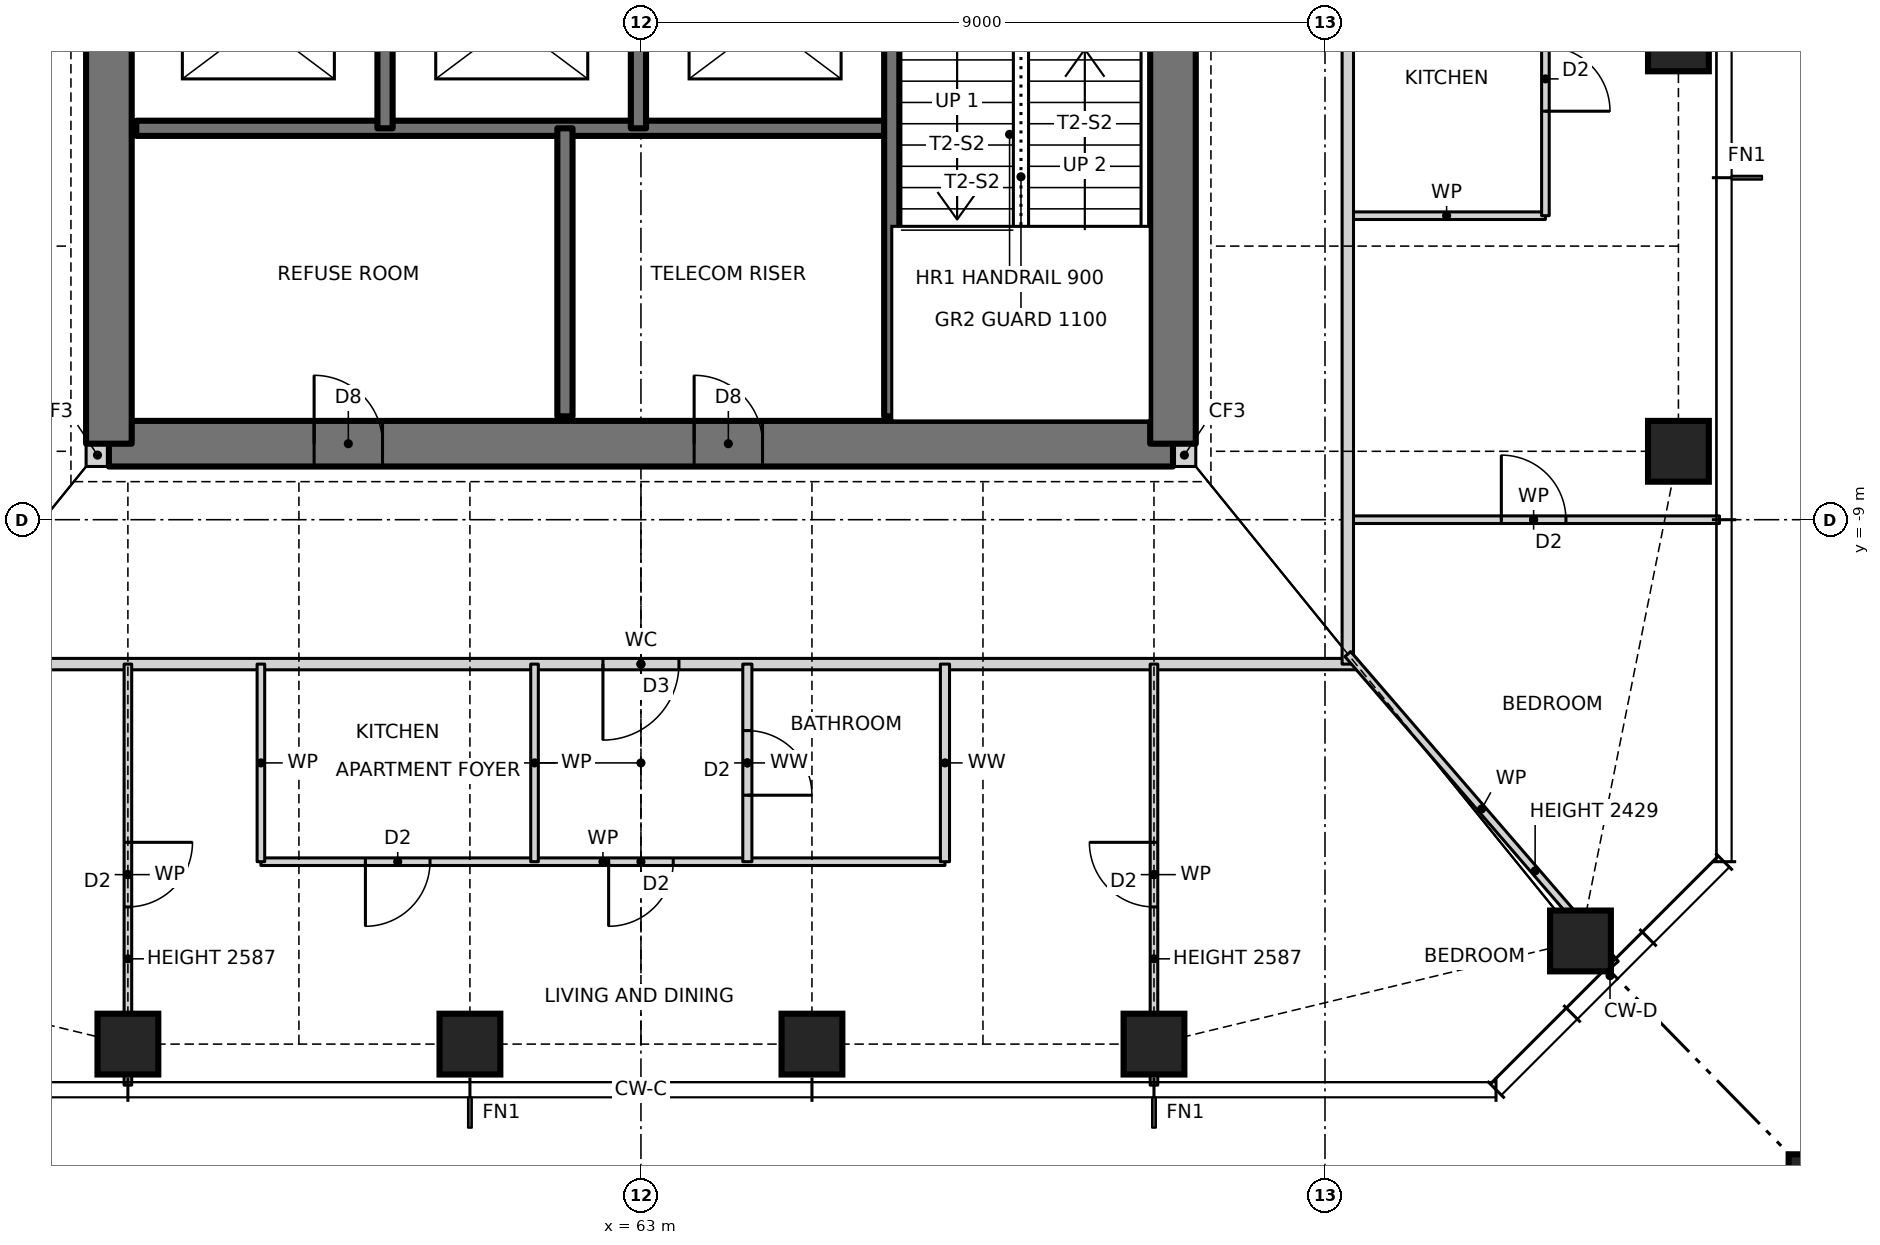
"""IFC4 building model, lengths in metres.
Left out: names, types, materials, properties, quantities, classifications, styles, units other than length and angle.
Written with IfcOpenShell. Run it as: python <this file> out.ifc"""

import sys

from ifc_helpers import new_model, si_unit, direction, frame, frame_2d, origin, origin_2d, place, context, subcontext, project, spatial, rectangle, hollow_rectangle, extrude, element, fill, save


model = new_model("IFC4")
c1 = context("Model", 3, precision=1e-05, world=origin(), true_north=direction((0.0, 1.0)))
c2 = subcontext(c1, "Body", "Model", "MODEL_VIEW")
j1 = project(units=[si_unit("LENGTHUNIT", "METRE"), si_unit("PLANEANGLEUNIT", "RADIAN")], contexts=[c1])
p1 = place(None, origin())
s1 = spatial("IfcSite", under=j1, at=p1, CompositionType="ELEMENT")
p2 = place(p1, origin())
s2 = spatial("IfcBuilding", under=s1, at=p2, CompositionType="ELEMENT")
p3 = place(p2, frame((0.0, 0.0, 122.5)))
s3 = spatial("IfcBuildingStorey", under=s2, at=p3, CompositionType="ELEMENT", Elevation=122.5)
for number, where, z_axis, x_axis in (
    (1, (56.25, -15.9, 0.0), (0.0, 0.0, 1.0), (1.0, 0.0, 0.0)),
    (2, (60.75, -15.9, 0.0), (0.0, 0.0, 1.0), (1.0, 0.0, 0.0)),
    (3, (65.25, -15.9, 0.0), (0.0, 0.0, 1.0), (1.0, 0.0, 0.0)),
    (4, (69.75, -15.9, 0.0), (0.0, 0.0, 1.0), (1.0, 0.0, 0.0)),
    (5, (75.361, -14.543, 0.0), (0.0, 0.0, 1.0), (1.0, 0.0, 0.0)),
    (6, (76.65, -8.1, 0.0), (0.0, 0.0, 1.0), (1.0, 0.0, 0.0)),
    (7, (76.65, -2.7, 0.0), (0.0, 0.0, 1.0), (1.0, 0.0, 0.0)),
):
    element("IfcColumn", number, at=place(p3, frame(where, z_axis=z_axis, x_axis=x_axis)), inside=s3, PredefinedType="COLUMN", context=c2, shape_type="SweptSolid", body=[
        extrude(hollow_rectangle(XDim=0.8, YDim=0.8, WallThickness=0.1, at=origin_2d()), origin(), (0.0, 0.0, 1.0), 3.5),
    ])
p4 = place(p3, frame((78.65, -17.9, 0.0), z_axis=(0.0, 0.0, 1.0), x_axis=(1.0, 0.0, 0.0)))
e8 = element("IfcColumn", 8, at=p4, inside=s3, PredefinedType="COLUMN", context=c2, shape_type="SweptSolid", body=[
    extrude(hollow_rectangle(XDim=1.1, YDim=1.1, WallThickness=0.06, at=origin_2d()), origin(), (0.0, 0.0, 1.0), 3.5),
])
for number, where, z_axis, x_axis in (
    (9, (55.7, -8.15, 0.0), (0.0, 0.0, 1.0), (1.0, 0.0, 0.0)),
    (10, (70.0, -8.15, 0.0), (0.0, 0.0, 1.0), (1.0, 0.0, 0.0)),
):
    element("IfcWall", number, at=place(p3, frame(where, z_axis=z_axis, x_axis=x_axis)), inside=s3, PredefinedType="SOLIDWALL", context=c2, shape_type="SweptSolid", body=[
        extrude(rectangle(XDim=0.3, YDim=0.3, at=frame_2d((0.15, 0.0))), origin(), (0.0, 0.0, 1.0), 3.5),
    ])
p5 = place(p3, frame((56.0, -8.0, 0.0), z_axis=(0.0, 0.0, 1.0), x_axis=(1.0, 0.0, 0.0)))
e11 = element("IfcWall", 11, at=p5, inside=s3, PredefinedType="SHEAR", context=c2, shape_type="SweptSolid", body=[
    extrude(rectangle(XDim=14.0, YDim=0.6, at=frame_2d((7.0, 0.0))), origin(), (0.0, 0.0, 1.0), 3.5),
])
p6 = place(p5, frame((2.7, 0.0, 0.0)))
e12 = element("IfcOpeningElement", 12, at=p6, cuts=e11, PredefinedType="OPENING", context=c2, shape_type="SweptSolid", body=[
    extrude(rectangle(XDim=0.9, YDim=2.1, at=frame_2d((0.45, 1.05))), frame((0.0, 0.31, 0.0), z_axis=(0.0, -1.0, 0.0), x_axis=(1.0, 0.0, 0.0)), (0.0, 0.0, 1.0), 0.62),
])
p7 = place(p5, frame((7.7, 0.0, 0.0)))
e13 = element("IfcOpeningElement", 13, at=p7, cuts=e11, PredefinedType="OPENING", context=c2, shape_type="SweptSolid", body=[
    extrude(rectangle(XDim=0.9, YDim=2.1, at=frame_2d((0.45, 1.05))), frame((0.0, 0.31, 0.0), z_axis=(0.0, -1.0, 0.0), x_axis=(1.0, 0.0, 0.0)), (0.0, 0.0, 1.0), 0.62),
])
p8 = place(p3, frame((70.0, -8.0, 0.0), z_axis=(0.0, 0.0, 1.0), x_axis=(0.0, 1.0, 0.0)))
e14 = element("IfcWall", 14, at=p8, inside=s3, PredefinedType="SHEAR", context=c2, shape_type="SweptSolid", body=[
    extrude(rectangle(XDim=16.0, YDim=0.6, at=frame_2d((8.0, 0.0))), origin(), (0.0, 0.0, 1.0), 3.5),
])
p9 = place(p8, frame((7.5, 0.0, 0.0)))
e15 = element("IfcOpeningElement", 15, at=p9, cuts=e14, PredefinedType="OPENING", context=c2, shape_type="SweptSolid", body=[
    extrude(rectangle(XDim=1.0, YDim=2.1, at=frame_2d((0.5, 1.05))), frame((0.0, 0.31, 0.0), z_axis=(0.0, -1.0, 0.0), x_axis=(1.0, 0.0, 0.0)), (0.0, 0.0, 1.0), 0.62),
])
p10 = place(p3, frame((56.0, 8.0, 0.0), z_axis=(0.0, 0.0, 1.0), x_axis=(0.0, -1.0, 0.0)))
e16 = element("IfcWall", 16, at=p10, inside=s3, PredefinedType="SHEAR", context=c2, shape_type="SweptSolid", body=[
    extrude(rectangle(XDim=16.0, YDim=0.6, at=frame_2d((8.0, 0.0))), origin(), (0.0, 0.0, 1.0), 3.5),
])
p11 = place(p10, frame((7.5, 0.0, 0.0)))
e17 = element("IfcOpeningElement", 17, at=p11, cuts=e16, PredefinedType="OPENING", context=c2, shape_type="SweptSolid", body=[
    extrude(rectangle(XDim=1.0, YDim=2.1, at=frame_2d((0.5, 1.05))), frame((0.0, 0.31, 0.0), z_axis=(0.0, -1.0, 0.0), x_axis=(1.0, 0.0, 0.0)), (0.0, 0.0, 1.0), 0.62),
])
p12 = place(p3, frame((58.0, -13.5, 0.0), z_axis=(0.0, 0.0, 1.0), x_axis=(1.0, 0.0, 0.0)))
e18 = element("IfcWall", 18, at=p12, inside=s3, PredefinedType="PARTITIONING", context=c2, shape_type="SweptSolid", body=[
    extrude(rectangle(XDim=9.0, YDim=0.1, at=frame_2d((4.5, 0.0))), origin(), (0.0, 0.0, 1.0), 3.27),
])
p13 = place(p12, frame((1.375, 0.0, 0.0)))
e19 = element("IfcOpeningElement", 19, at=p13, cuts=e18, PredefinedType="OPENING", context=c2, shape_type="SweptSolid", body=[
    extrude(rectangle(XDim=0.85, YDim=2.1, at=frame_2d((0.425, 1.05))), frame((0.0, 0.06, 0.0), z_axis=(0.0, -1.0, 0.0), x_axis=(1.0, 0.0, 0.0)), (0.0, 0.0, 1.0), 0.12),
])
p14 = place(p12, frame((4.575, 0.0, 0.0)))
e20 = element("IfcOpeningElement", 20, at=p14, cuts=e18, PredefinedType="OPENING", context=c2, shape_type="SweptSolid", body=[
    extrude(rectangle(XDim=0.85, YDim=2.1, at=frame_2d((0.425, 1.05))), frame((0.0, 0.06, 0.0), z_axis=(0.0, -1.0, 0.0), x_axis=(1.0, 0.0, 0.0)), (0.0, 0.0, 1.0), 0.12),
])
p15 = place(p3, frame((53.586, -10.9, 0.0), z_axis=(0.0, 0.0, 1.0), x_axis=(1.0, 0.0, 0.0)))
e21 = element("IfcWall", 21, at=p15, inside=s3, PredefinedType="PARTITIONING", context=c2, shape_type="SweptSolid", body=[
    extrude(rectangle(XDim=18.828, YDim=0.15, at=frame_2d((9.414, 0.0))), origin(), (0.0, 0.0, 1.0), 3.27),
])
p16 = place(p15, frame((8.914, 0.0, 0.0)))
e22 = element("IfcOpeningElement", 22, at=p16, cuts=e21, PredefinedType="OPENING", context=c2, shape_type="SweptSolid", body=[
    extrude(rectangle(XDim=1.0, YDim=2.1, at=frame_2d((0.5, 1.05))), frame((0.0, 0.085, 0.0), z_axis=(0.0, -1.0, 0.0), x_axis=(1.0, 0.0, 0.0)), (0.0, 0.0, 1.0), 0.17),
])
p17 = place(p3, frame((72.3, -9.0, 0.0), z_axis=(0.0, 0.0, 1.0), x_axis=(1.0, 0.0, 0.0)))
e23 = element("IfcWall", 23, at=p17, inside=s3, PredefinedType="PARTITIONING", context=c2, shape_type="SweptSolid", body=[
    extrude(rectangle(XDim=4.89, YDim=0.1, at=frame_2d((2.445, 0.0))), origin(), (0.0, 0.0, 1.0), 3.27),
])
p18 = place(p17, frame((2.02, 0.0, 0.0)))
e24 = element("IfcOpeningElement", 24, at=p18, cuts=e23, PredefinedType="OPENING", context=c2, shape_type="SweptSolid", body=[
    extrude(rectangle(XDim=0.85, YDim=2.1, at=frame_2d((0.425, 1.05))), frame((0.0, 0.06, 0.0), z_axis=(0.0, -1.0, 0.0), x_axis=(1.0, 0.0, 0.0)), (0.0, 0.0, 1.0), 0.12),
])
p19 = place(p3, frame((72.3, -5.0, 0.0), z_axis=(0.0, 0.0, 1.0), x_axis=(1.0, 0.0, 0.0)))
e25 = element("IfcWall", 25, at=p19, inside=s3, PredefinedType="PARTITIONING", context=c2, shape_type="SweptSolid", body=[
    extrude(rectangle(XDim=2.6, YDim=0.1, at=frame_2d((1.3, 0.0))), origin(), (0.0, 0.0, 1.0), 3.27),
])
p20 = place(p3, frame((56.36, -3.85, 0.0), z_axis=(0.0, 0.0, 1.0), x_axis=(1.0, 0.0, 0.0)))
e26 = element("IfcWall", 26, at=p20, inside=s3, PredefinedType="SOLIDWALL", context=c2, shape_type="SweptSolid", body=[
    extrude(rectangle(XDim=9.94, YDim=0.2, at=frame_2d((4.97, 0.0))), origin(), (0.0, 0.0, 1.0), 3.5),
])
p21 = place(p3, frame((74.9, -5.0, 0.0), z_axis=(0.0, 0.0, 1.0), x_axis=(0.0, 1.0, 0.0)))
e27 = element("IfcWall", 27, at=p21, inside=s3, PredefinedType="PARTITIONING", context=c2, shape_type="SweptSolid", body=[
    extrude(rectangle(XDim=9.0, YDim=0.1, at=frame_2d((4.5, 0.0))), origin(), (0.0, 0.0, 1.0), 3.27),
])
p22 = place(p21, frame((1.375, 0.0, 0.0)))
e28 = element("IfcOpeningElement", 28, at=p22, cuts=e27, PredefinedType="OPENING", context=c2, shape_type="SweptSolid", body=[
    extrude(rectangle(XDim=0.85, YDim=2.1, at=frame_2d((0.425, 1.05))), frame((0.0, 0.06, 0.0), z_axis=(0.0, -1.0, 0.0), x_axis=(1.0, 0.0, 0.0)), (0.0, 0.0, 1.0), 0.12),
])
p23 = place(p21, frame((4.575, 0.0, 0.0)))
e29 = element("IfcOpeningElement", 29, at=p23, cuts=e27, PredefinedType="OPENING", context=c2, shape_type="SweptSolid", body=[
    extrude(rectangle(XDim=0.85, YDim=2.1, at=frame_2d((0.425, 1.05))), frame((0.0, 0.06, 0.0), z_axis=(0.0, -1.0, 0.0), x_axis=(1.0, 0.0, 0.0)), (0.0, 0.0, 1.0), 0.12),
])
p24 = place(p3, frame((72.3, -10.9, 0.0), z_axis=(0.0, 0.0, 1.0), x_axis=(0.0, 1.0, 0.0)))
e30 = element("IfcWall", 30, at=p24, inside=s3, PredefinedType="PARTITIONING", context=c2, shape_type="SweptSolid", body=[
    extrude(rectangle(XDim=21.668, YDim=0.15, at=frame_2d((10.834, 0.0))), origin(), (0.0, 0.0, 1.0), 3.27),
])
p25 = place(p24, frame((10.4, 0.0, 0.0)))
e31 = element("IfcOpeningElement", 31, at=p25, cuts=e30, PredefinedType="OPENING", context=c2, shape_type="SweptSolid", body=[
    extrude(rectangle(XDim=1.0, YDim=2.1, at=frame_2d((0.5, 1.05))), frame((0.0, 0.085, 0.0), z_axis=(0.0, -1.0, 0.0), x_axis=(1.0, 0.0, 0.0)), (0.0, 0.0, 1.0), 0.17),
])
p26 = place(p3, frame((69.75, -16.44, 0.0), z_axis=(0.0, 0.0, 1.0), x_axis=(0.0, 1.0, 0.0)))
e32 = element("IfcWall", 32, at=p26, inside=s3, PredefinedType="PARTITIONING", context=c2, shape_type="SweptSolid", body=[
    extrude(rectangle(XDim=5.54, YDim=0.1, at=frame_2d((2.77, 0.0))), origin(), (0.0, 0.0, 1.0), 2.587),
])
p27 = place(p26, frame((2.345, 0.0, 0.0)))
e33 = element("IfcOpeningElement", 33, at=p27, cuts=e32, PredefinedType="OPENING", context=c2, shape_type="SweptSolid", body=[
    extrude(rectangle(XDim=0.85, YDim=2.1, at=frame_2d((0.425, 1.05))), frame((0.0, 0.06, 0.0), z_axis=(0.0, -1.0, 0.0), x_axis=(1.0, 0.0, 0.0)), (0.0, 0.0, 1.0), 0.12),
])
p28 = place(p3, frame((67.0, -13.5, 0.0), z_axis=(0.0, 0.0, 1.0), x_axis=(0.0, 1.0, 0.0)))
e34 = element("IfcWall", 34, at=p28, inside=s3, PredefinedType="PARTITIONING", context=c2, shape_type="SweptSolid", body=[
    extrude(rectangle(XDim=2.6, YDim=0.12, at=frame_2d((1.3, 0.0))), origin(), (0.0, 0.0, 1.0), 3.27),
])
p29 = place(p3, frame((66.3, -7.64, 0.0), z_axis=(0.0, 0.0, 1.0), x_axis=(0.0, 1.0, 0.0)))
e35 = element("IfcWall", 35, at=p29, inside=s3, PredefinedType="SOLIDWALL", context=c2, shape_type="SweptSolid", body=[
    extrude(rectangle(XDim=11.49, YDim=0.2, at=frame_2d((5.745, 0.0))), origin(), (0.0, 0.0, 1.0), 3.5),
])
p30 = place(p29, frame((7.04, 0.0, 0.0)))
e36 = element("IfcOpeningElement", 36, at=p30, cuts=e35, PredefinedType="OPENING", context=c2, shape_type="SweptSolid", body=[
    extrude(rectangle(XDim=1.2, YDim=2.1, at=frame_2d((0.6, 1.05))), frame((0.0, 0.11, 0.0), z_axis=(0.0, -1.0, 0.0), x_axis=(1.0, 0.0, 0.0)), (0.0, 0.0, 1.0), 0.22),
])
p31 = place(p3, frame((64.4, -13.5, 0.0), z_axis=(0.0, 0.0, 1.0), x_axis=(0.0, 1.0, 0.0)))
e37 = element("IfcWall", 37, at=p31, inside=s3, PredefinedType="PARTITIONING", context=c2, shape_type="SweptSolid", body=[
    extrude(rectangle(XDim=2.6, YDim=0.12, at=frame_2d((1.3, 0.0))), origin(), (0.0, 0.0, 1.0), 3.27),
])
p32 = place(p31, frame((0.875, 0.0, 0.0)))
e38 = element("IfcOpeningElement", 38, at=p32, cuts=e37, PredefinedType="OPENING", context=c2, shape_type="SweptSolid", body=[
    extrude(rectangle(XDim=0.85, YDim=2.1, at=frame_2d((0.425, 1.05))), frame((0.0, 0.07, 0.0), z_axis=(0.0, -1.0, 0.0), x_axis=(1.0, 0.0, 0.0)), (0.0, 0.0, 1.0), 0.14),
])
p33 = place(p3, frame((62.967, -3.85, 0.0), z_axis=(0.0, 0.0, 1.0), x_axis=(0.0, 1.0, 0.0)))
e39 = element("IfcWall", 39, at=p33, inside=s3, PredefinedType="SOLIDWALL", context=c2, shape_type="SweptSolid", body=[
    extrude(rectangle(XDim=2.8, YDim=0.2, at=frame_2d((1.4, 0.0))), origin(), (0.0, 0.0, 1.0), 3.5),
])
p34 = place(p3, frame((62.0, -7.64, 0.0), z_axis=(0.0, 0.0, 1.0), x_axis=(0.0, 1.0, 0.0)))
e40 = element("IfcWall", 40, at=p34, inside=s3, PredefinedType="SOLIDWALL", context=c2, shape_type="SweptSolid", body=[
    extrude(rectangle(XDim=3.79, YDim=0.2, at=frame_2d((1.895, 0.0))), origin(), (0.0, 0.0, 1.0), 3.5),
])
p35 = place(p3, frame((61.6, -13.5, 0.0), z_axis=(0.0, 0.0, 1.0), x_axis=(0.0, 1.0, 0.0)))
e41 = element("IfcWall", 41, at=p35, inside=s3, PredefinedType="PARTITIONING", context=c2, shape_type="SweptSolid", body=[
    extrude(rectangle(XDim=2.6, YDim=0.1, at=frame_2d((1.3, 0.0))), origin(), (0.0, 0.0, 1.0), 3.27),
])
p36 = place(p3, frame((59.633, -3.85, 0.0), z_axis=(0.0, 0.0, 1.0), x_axis=(0.0, 1.0, 0.0)))
e42 = element("IfcWall", 42, at=p36, inside=s3, PredefinedType="SOLIDWALL", context=c2, shape_type="SweptSolid", body=[
    extrude(rectangle(XDim=2.8, YDim=0.2, at=frame_2d((1.4, 0.0))), origin(), (0.0, 0.0, 1.0), 3.5),
])
p37 = place(p3, frame((58.0, -13.5, 0.0), z_axis=(0.0, 0.0, 1.0), x_axis=(0.0, 1.0, 0.0)))
e43 = element("IfcWall", 43, at=p37, inside=s3, PredefinedType="PARTITIONING", context=c2, shape_type="SweptSolid", body=[
    extrude(rectangle(XDim=2.6, YDim=0.1, at=frame_2d((1.3, 0.0))), origin(), (0.0, 0.0, 1.0), 3.27),
])
p38 = place(p3, frame((56.25, -16.44, 0.0), z_axis=(0.0, 0.0, 1.0), x_axis=(0.0, 1.0, 0.0)))
e44 = element("IfcWall", 44, at=p38, inside=s3, PredefinedType="PARTITIONING", context=c2, shape_type="SweptSolid", body=[
    extrude(rectangle(XDim=5.54, YDim=0.1, at=frame_2d((2.77, 0.0))), origin(), (0.0, 0.0, 1.0), 2.587),
])
p39 = place(p38, frame((2.345, 0.0, 0.0)))
e45 = element("IfcOpeningElement", 45, at=p39, cuts=e44, PredefinedType="OPENING", context=c2, shape_type="SweptSolid", body=[
    extrude(rectangle(XDim=0.85, YDim=2.1, at=frame_2d((0.425, 1.05))), frame((0.0, 0.06, 0.0), z_axis=(0.0, -1.0, 0.0), x_axis=(1.0, 0.0, 0.0)), (0.0, 0.0, 1.0), 0.12),
])
p40 = place(p3, frame((75.821, -14.844, 0.0), z_axis=(0.0, 0.0, 1.0), x_axis=(-0.653713095188, 0.756742485381, 0.0)))
e46 = element("IfcWall", 46, at=p40, inside=s3, PredefinedType="PARTITIONING", context=c2, shape_type="SweptSolid", body=[
    extrude(rectangle(XDim=5.386, YDim=0.1, at=frame_2d((2.693, 0.0))), origin(), (0.0, 0.0, 1.0), 2.429),
])
p41 = place(p13, frame((0.85, 0.0, 0.0), z_axis=(0.0, 0.0, 1.0), x_axis=(-1.0, 0.0, 0.0)))
e47 = element("IfcDoor", 47, at=p41, inside=s3, OperationType="SINGLE_SWING_RIGHT", PredefinedType="DOOR", context=c2, shape_type="SweptSolid", body=[
    extrude(rectangle(XDim=0.85, YDim=2.1, at=frame_2d((0.425, 1.05))), frame((0.0, 0.025, 0.0), z_axis=(0.0, -1.0, 0.0), x_axis=(1.0, 0.0, 0.0)), (0.0, 0.0, 1.0), 0.05),
])
fill(e19, e47)
p42 = place(p16, frame((1.0, 0.0, 0.0), z_axis=(0.0, 0.0, 1.0), x_axis=(-1.0, 0.0, 0.0)))
e48 = element("IfcDoor", 48, at=p42, inside=s3, OperationType="SINGLE_SWING_RIGHT", PredefinedType="DOOR", context=c2, shape_type="SweptSolid", body=[
    extrude(rectangle(XDim=1.0, YDim=2.1, at=frame_2d((0.5, 1.05))), frame((0.0, 0.025, 0.0), z_axis=(0.0, -1.0, 0.0), x_axis=(1.0, 0.0, 0.0)), (0.0, 0.0, 1.0), 0.05),
])
fill(e22, e48)
p43 = place(p14, frame((0.85, 0.0, 0.0), z_axis=(0.0, 0.0, 1.0), x_axis=(-1.0, 0.0, 0.0)))
e49 = element("IfcDoor", 49, at=p43, inside=s3, OperationType="SINGLE_SWING_RIGHT", PredefinedType="DOOR", context=c2, shape_type="SweptSolid", body=[
    extrude(rectangle(XDim=0.85, YDim=2.1, at=frame_2d((0.425, 1.05))), frame((0.0, 0.025, 0.0), z_axis=(0.0, -1.0, 0.0), x_axis=(1.0, 0.0, 0.0)), (0.0, 0.0, 1.0), 0.05),
])
fill(e20, e49)
p44 = place(p32, frame((0.85, 0.0, 0.0), z_axis=(0.0, 0.0, 1.0), x_axis=(-1.0, 0.0, 0.0)))
e50 = element("IfcDoor", 50, at=p44, inside=s3, OperationType="SINGLE_SWING_RIGHT", PredefinedType="DOOR", context=c2, shape_type="SweptSolid", body=[
    extrude(rectangle(XDim=0.85, YDim=2.1, at=frame_2d((0.425, 1.05))), frame((0.0, 0.025, 0.0), z_axis=(0.0, -1.0, 0.0), x_axis=(1.0, 0.0, 0.0)), (0.0, 0.0, 1.0), 0.05),
])
fill(e38, e50)
p45 = place(p39, frame((0.85, 0.0, 0.0), z_axis=(0.0, 0.0, 1.0), x_axis=(-1.0, 0.0, 0.0)))
e51 = element("IfcDoor", 51, at=p45, inside=s3, OperationType="SINGLE_SWING_LEFT", PredefinedType="DOOR", context=c2, shape_type="SweptSolid", body=[
    extrude(rectangle(XDim=0.85, YDim=2.1, at=frame_2d((0.425, 1.05))), frame((0.0, 0.025, 0.0), z_axis=(0.0, -1.0, 0.0), x_axis=(1.0, 0.0, 0.0)), (0.0, 0.0, 1.0), 0.05),
])
fill(e45, e51)
p46 = place(p27, origin())
e52 = element("IfcDoor", 52, at=p46, inside=s3, OperationType="SINGLE_SWING_RIGHT", PredefinedType="DOOR", context=c2, shape_type="SweptSolid", body=[
    extrude(rectangle(XDim=0.85, YDim=2.1, at=frame_2d((0.425, 1.05))), frame((0.0, 0.025, 0.0), z_axis=(0.0, -1.0, 0.0), x_axis=(1.0, 0.0, 0.0)), (0.0, 0.0, 1.0), 0.05),
])
fill(e33, e52)
p47 = place(p22, frame((0.85, 0.0, 0.0), z_axis=(0.0, 0.0, 1.0), x_axis=(-1.0, 0.0, 0.0)))
e53 = element("IfcDoor", 53, at=p47, inside=s3, OperationType="SINGLE_SWING_RIGHT", PredefinedType="DOOR", context=c2, shape_type="SweptSolid", body=[
    extrude(rectangle(XDim=0.85, YDim=2.1, at=frame_2d((0.425, 1.05))), frame((0.0, 0.025, 0.0), z_axis=(0.0, -1.0, 0.0), x_axis=(1.0, 0.0, 0.0)), (0.0, 0.0, 1.0), 0.05),
])
fill(e28, e53)
p48 = place(p18, origin())
e54 = element("IfcDoor", 54, at=p48, inside=s3, OperationType="SINGLE_SWING_LEFT", PredefinedType="DOOR", context=c2, shape_type="SweptSolid", body=[
    extrude(rectangle(XDim=0.85, YDim=2.1, at=frame_2d((0.425, 1.05))), frame((0.0, 0.025, 0.0), z_axis=(0.0, -1.0, 0.0), x_axis=(1.0, 0.0, 0.0)), (0.0, 0.0, 1.0), 0.05),
])
fill(e24, e54)
p49 = place(p6, origin())
e55 = element("IfcDoor", 55, at=p49, inside=s3, OperationType="SINGLE_SWING_LEFT", PredefinedType="DOOR", context=c2, shape_type="SweptSolid", body=[
    extrude(rectangle(XDim=0.9, YDim=2.1, at=frame_2d((0.45, 1.05))), frame((0.0, 0.025, 0.0), z_axis=(0.0, -1.0, 0.0), x_axis=(1.0, 0.0, 0.0)), (0.0, 0.0, 1.0), 0.05),
])
fill(e12, e55)
p50 = place(p7, origin())
e56 = element("IfcDoor", 56, at=p50, inside=s3, OperationType="SINGLE_SWING_LEFT", PredefinedType="DOOR", context=c2, shape_type="SweptSolid", body=[
    extrude(rectangle(XDim=0.9, YDim=2.1, at=frame_2d((0.45, 1.05))), frame((0.0, 0.025, 0.0), z_axis=(0.0, -1.0, 0.0), x_axis=(1.0, 0.0, 0.0)), (0.0, 0.0, 1.0), 0.05),
])
fill(e13, e56)
save(model, sys.argv[1])
